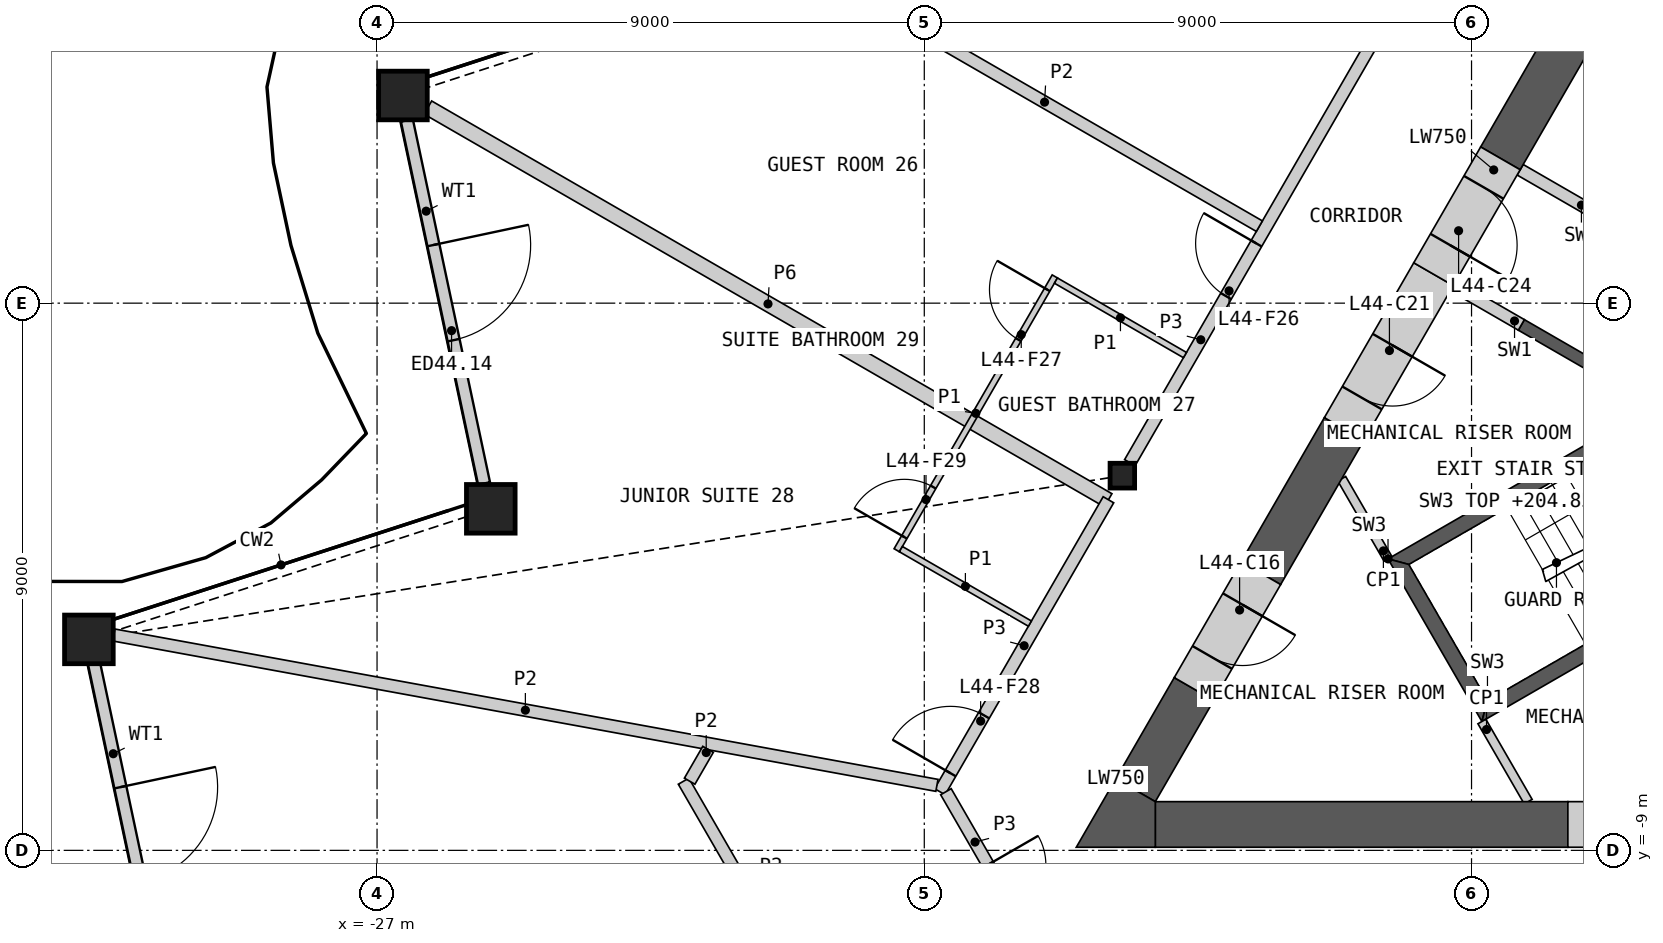
"""IFC4 building model, lengths in metres.
Left out: names, types, materials, properties, quantities, classifications, styles, units other than length and angle.
Written with IfcOpenShell. Run it as: python <this file> out.ifc"""

import sys

from ifc_helpers import new_model, si_unit, direction, frame, frame_2d, origin, origin_2d, place, context, subcontext, project, spatial, polyline, rectangle, hollow_rectangle, i_section, outline, extrude, element, fill, save


model = new_model("IFC4")
c1 = context("Model", 3, precision=1e-05, world=origin(), true_north=direction((0.0, 1.0)))
c2 = subcontext(c1, "Body", "Model", "MODEL_VIEW")
j1 = project(units=[si_unit("LENGTHUNIT", "METRE"), si_unit("PLANEANGLEUNIT", "RADIAN")], contexts=[c1])
p1 = place(None, origin())
s1 = spatial("IfcSite", under=j1, at=p1, CompositionType="ELEMENT")
p2 = place(p1, origin())
s2 = spatial("IfcBuilding", under=s1, at=p2, CompositionType="ELEMENT")
p3 = place(p2, frame((0.0, 0.0, 201.6)))
s3 = spatial("IfcBuildingStorey", under=s2, at=p3, CompositionType="ELEMENT", Elevation=201.6)
for number, where, z_axis, x_axis in (
    (1, (-26.574, 3.415, 0.0), (0.0, 0.0, 1.0), (1.0, 0.0, 0.0)),
    (2, (-25.129, -3.383, 0.0), (0.0, 0.0, 1.0), (1.0, 0.0, 0.0)),
    (3, (-31.739, -5.53, 0.0), (0.0, 0.0, 1.0), (1.0, 0.0, 0.0)),
):
    element("IfcColumn", number, at=place(p3, frame(where, z_axis=z_axis, x_axis=x_axis)), inside=s3, PredefinedType="COLUMN", context=c2, shape_type="SweptSolid", body=[
        extrude(hollow_rectangle(XDim=0.8, YDim=0.8, WallThickness=0.05, at=origin_2d()), origin(), (0.0, 0.0, 1.0), 3.6),
    ])
p4 = place(p3, frame((-14.743, -2.837, 0.0), z_axis=(0.0, 0.0, 1.0), x_axis=(1.0, 0.0, 0.0)))
e4 = element("IfcColumn", 4, at=p4, inside=s3, PredefinedType="COLUMN", context=c2, shape_type="SweptSolid", body=[
    extrude(i_section(OverallWidth=0.404, OverallDepth=0.407, WebThickness=0.027, FlangeThickness=0.044, at=origin_2d()), origin(), (0.0, 0.0, 1.0), 3.6),
])
p5 = place(p3, frame((-26.51, 3.006, 0.0), z_axis=(0.0, 0.0, 1.0), x_axis=(0.207920445063, -0.978145739921, 0.0)))
e5 = element("IfcWall", 5, at=p5, inside=s3, PredefinedType="SOLIDWALL", context=c2, shape_type="SweptSolid", body=[
    extrude(rectangle(XDim=6.106, YDim=0.2, at=frame_2d((3.053, 0.0))), origin(), (0.0, 0.0, 1.0), 2.701),
])
p6 = place(p5, frame((2.096, 0.0, 0.0)))
e6 = element("IfcOpeningElement", 6, at=p6, cuts=e5, PredefinedType="OPENING", context=c2, shape_type="SweptSolid", body=[
    extrude(rectangle(XDim=1.6, YDim=2.4, at=frame_2d((0.8, 1.2))), frame((0.0, 0.11, 0.0), z_axis=(0.0, -1.0, 0.0), x_axis=(1.0, 0.0, 0.0)), (0.0, 0.0, 1.0), 0.22),
])
p7 = place(p3, frame((-31.657, -5.91, 0.0), z_axis=(0.0, 0.0, 1.0), x_axis=(0.207917293494, -0.978146409831, 0.0)))
e7 = element("IfcWall", 7, at=p7, inside=s3, PredefinedType="SOLIDWALL", context=c2, shape_type="SweptSolid", body=[
    extrude(rectangle(XDim=6.135, YDim=0.2, at=frame_2d((3.068, 0.0))), origin(), (0.0, 0.0, 1.0), 2.701),
])
p8 = place(p7, frame((2.096, 0.0, 0.0)))
e8 = element("IfcOpeningElement", 8, at=p8, cuts=e7, PredefinedType="OPENING", context=c2, shape_type="SweptSolid", body=[
    extrude(rectangle(XDim=1.6, YDim=2.4, at=frame_2d((0.8, 1.2))), frame((0.0, 0.11, 0.0), z_axis=(0.0, -1.0, 0.0), x_axis=(1.0, 0.0, 0.0)), (0.0, 0.0, 1.0), 0.22),
])
p9 = place(p3, origin())
e9 = element("IfcWall", 9, at=p9, inside=s3, PredefinedType="SHEAR", context=c2, shape_type="SweptSolid", body=[
    extrude(outline(polyline([(-6.061, -1.697), (-8.231, -0.444), (-8.131, -0.271), (-5.96, -1.524), (-6.061, -1.697)])), origin(), (0.0, 0.0, 1.0), 3.25),
])
for number, where, z_axis, x_axis in (
    (10, (-7.081, 1.548, 0.0), (0.0, 0.0, 1.0), (-0.866, 0.5, 0.0)),
    (11, (-8.181, -0.357, 0.0), (0.0, 0.0, 1.0), (-0.866, 0.5, 0.0)),
):
    element("IfcWall", number, at=place(p3, frame(where, z_axis=z_axis, x_axis=x_axis)), inside=s3, PredefinedType="SHEAR", context=c2, shape_type="SweptSolid", body=[
        extrude(rectangle(XDim=1.293, YDim=0.2, at=frame_2d((0.646, 0.0))), origin(), (0.0, 0.0, 1.0), 3.25),
    ])
p10 = place(p3, origin())
e12 = element("IfcWall", 12, at=p10, inside=s3, PredefinedType="SHEAR", context=c2, shape_type="SweptSolid", body=[
    extrude(outline(polyline([(-5.307, -1.281), (-10.374, -4.206), (-10.032, -4.298), (-5.182, -1.498), (-5.307, -1.281)])), origin(), (0.0, 0.0, 1.0), 3.25),
])
p11 = place(p3, origin())
e13 = element("IfcWall", 13, at=p11, inside=s3, PredefinedType="SHEAR", context=c2, shape_type="SweptSolid", body=[
    extrude(outline(polyline([(-10.374, -4.206), (-8.83, -6.881), (-8.738, -6.539), (-10.032, -4.298), (-10.374, -4.206)])), origin(), (0.0, 0.0, 1.0), 3.25),
])
p12 = place(p3, origin())
e14 = element("IfcWall", 14, at=p12, inside=s3, PredefinedType="SHEAR", context=c2, shape_type="SweptSolid", body=[
    extrude(outline(polyline([(-8.738, -6.539), (-8.83, -6.881), (-3.763, -3.956), (-3.888, -3.739), (-8.738, -6.539)])), origin(), (0.0, 0.0, 1.0), 3.25),
])
for number, where, z_axis, x_axis in (
    (15, (-8.83, -6.881, 0.0), (0.0, 0.0, 1.0), (0.5, -0.866, 0.0)),
    (16, (-10.374, -4.206, 0.0), (0.0, 0.0, 1.0), (-0.5, 0.866, 0.0)),
):
    element("IfcWall", number, at=place(p3, frame(where, z_axis=z_axis, x_axis=x_axis)), inside=s3, PredefinedType="PARTITIONING", context=c2, shape_type="SweptSolid", body=[
        extrude(rectangle(XDim=1.522, YDim=0.15, at=frame_2d((0.761, 0.0))), origin(), (0.0, 0.0, 1.0), 3.25),
    ])
p13 = place(p3, frame((-14.201, -8.574, 0.0), z_axis=(0.0, 0.0, 1.0), x_axis=(1.0, 0.0, 0.0)))
e17 = element("IfcWall", 17, at=p13, inside=s3, PredefinedType="SHEAR", context=c2, shape_type="SweptSolid", body=[
    extrude(rectangle(XDim=6.785, YDim=0.75, at=frame_2d((3.393, 0.0))), origin(), (0.0, 0.0, 1.0), 3.25),
])
p14 = place(p3, frame((-7.006, 5.012, 0.0), z_axis=(0.0, 0.0, 1.0), x_axis=(-0.49996826437, -0.866043725583, 0.0)))
e18 = element("IfcWall", 18, at=p14, inside=s3, PredefinedType="SHEAR", context=c2, shape_type="SweptSolid", body=[
    extrude(rectangle(XDim=3.038, YDim=0.75, at=frame_2d((1.519, 0.0))), origin(), (0.0, 0.0, 1.0), 3.25),
])
p15 = place(p3, frame((-11.096, -2.07, 0.0), z_axis=(0.0, 0.0, 1.0), x_axis=(-0.49992834617, -0.86606676919, 0.0)))
e19 = element("IfcWall", 19, at=p15, inside=s3, PredefinedType="SHEAR", context=c2, shape_type="SweptSolid", body=[
    extrude(rectangle(XDim=2.737, YDim=0.75, at=frame_2d((1.369, 0.0))), origin(), (0.0, 0.0, 1.0), 3.25),
])
p16 = place(p3, frame((-13.564, -6.346, 0.0), z_axis=(0.0, 0.0, 1.0), x_axis=(-0.499989888488, -0.86603124159, 0.0)))
e20 = element("IfcWall", 20, at=p16, inside=s3, PredefinedType="SHEAR", context=c2, shape_type="SweptSolid", body=[
    extrude(rectangle(XDim=1.923, YDim=0.75, at=frame_2d((0.961, 0.0))), origin(), (0.0, 0.0, 1.0), 3.25),
])
p17 = place(p3, origin())
e21 = element("IfcWall", 21, at=p17, inside=s3, PredefinedType="SHEAR", context=c2, shape_type="SweptSolid", body=[
    extrude(outline(polyline([(-14.851, -7.824), (-14.201, -8.199), (-14.201, -8.949), (-15.5, -8.949), (-14.851, -7.824)])), origin(), (0.0, 0.0, 1.0), 3.25),
])
p18 = place(p3, frame((-12.464, -4.441, 0.0), z_axis=(0.0, 0.0, 1.0), x_axis=(-0.499994660107, -0.866028486751, 0.0)))
e22 = element("IfcWall", 22, at=p18, inside=s3, PredefinedType="SHEAR", context=c2, shape_type="SweptSolid", body=[
    extrude(rectangle(XDim=2.2, YDim=0.75, at=frame_2d((1.1, 0.0))), origin(), (0.0, 0.0, 1.0), 3.25),
])
p19 = place(p18, frame((0.6, 0.0, 0.0)))
e23 = element("IfcOpeningElement", 23, at=p19, cuts=e22, PredefinedType="OPENING", context=c2, shape_type="SweptSolid", body=[
    extrude(rectangle(XDim=1.0, YDim=2.1, at=frame_2d((0.5, 1.05))), frame((0.0, 0.385, 0.0), z_axis=(0.0, -1.0, 0.0), x_axis=(1.0, 0.0, 0.0)), (0.0, 0.0, 1.0), 0.77),
])
p20 = place(p3, frame((-9.625, 0.477, 0.0), z_axis=(0.0, 0.0, 1.0), x_axis=(-0.500005104963, -0.866022456413, 0.0)))
e24 = element("IfcWall", 24, at=p20, inside=s3, PredefinedType="SHEAR", context=c2, shape_type="SweptSolid", body=[
    extrude(rectangle(XDim=2.941, YDim=0.75, at=frame_2d((1.47, 0.0))), origin(), (0.0, 0.0, 1.0), 3.25),
])
p21 = place(p20, frame((1.35, 0.0, 0.0)))
e25 = element("IfcOpeningElement", 25, at=p21, cuts=e24, PredefinedType="OPENING", context=c2, shape_type="SweptSolid", body=[
    extrude(rectangle(XDim=1.0, YDim=2.1, at=frame_2d((0.5, 1.05))), frame((0.0, 0.385, 0.0), z_axis=(0.0, -1.0, 0.0), x_axis=(1.0, 0.0, 0.0)), (0.0, 0.0, 1.0), 0.77),
])
p22 = place(p3, frame((-7.416, -8.574, 0.0), z_axis=(0.0, 0.0, 1.0), x_axis=(1.0, 0.0, 0.0)))
e26 = element("IfcWall", 26, at=p22, inside=s3, PredefinedType="SHEAR", context=c2, shape_type="SweptSolid", body=[
    extrude(rectangle(XDim=2.2, YDim=0.75, at=frame_2d((1.1, 0.0))), origin(), (0.0, 0.0, 1.0), 3.25),
])
p23 = place(p22, frame((0.6, 0.0, 0.0)))
e27 = element("IfcOpeningElement", 27, at=p23, cuts=e26, PredefinedType="OPENING", context=c2, shape_type="SweptSolid", body=[
    extrude(rectangle(XDim=1.0, YDim=2.1, at=frame_2d((0.5, 1.05))), frame((0.0, 0.385, 0.0), z_axis=(0.0, -1.0, 0.0), x_axis=(1.0, 0.0, 0.0)), (0.0, 0.0, 1.0), 0.77),
])
p24 = place(p3, frame((-8.525, 2.382, 0.0), z_axis=(0.0, 0.0, 1.0), x_axis=(-0.500077893725, -0.86598042715, 0.0)))
e28 = element("IfcWall", 28, at=p24, inside=s3, PredefinedType="SHEAR", context=c2, shape_type="SweptSolid", body=[
    extrude(rectangle(XDim=2.2, YDim=0.75, at=frame_2d((1.1, 0.0))), origin(), (0.0, 0.0, 1.0), 3.25),
])
p25 = place(p24, frame((0.55, 0.0, 0.0)))
e29 = element("IfcOpeningElement", 29, at=p25, cuts=e28, PredefinedType="OPENING", context=c2, shape_type="SweptSolid", body=[
    extrude(rectangle(XDim=1.1, YDim=2.1, at=frame_2d((0.55, 1.05))), frame((0.0, 0.385, 0.0), z_axis=(0.0, -1.0, 0.0), x_axis=(1.0, 0.0, 0.0)), (0.0, 0.0, 1.0), 0.77),
])
p26 = place(p3, frame((-26.164, 3.217, 0.0), z_axis=(0.0, 0.0, 1.0), x_axis=(0.866026026416, -0.499998921569, 0.0)))
e30 = element("IfcWall", 30, at=p26, inside=s3, PredefinedType="PARTITIONING", context=c2, shape_type="SweptSolid", body=[
    extrude(rectangle(XDim=12.918, YDim=0.25, at=frame_2d((6.459, 0.0))), origin(), (0.0, 0.0, 1.0), 2.404),
])
p27 = place(p3, frame((-14.619, -2.624, 0.0), z_axis=(0.0, 0.0, 1.0), x_axis=(0.50000393355, 0.866023132736, 0.0)))
e31 = element("IfcWall", 31, at=p27, inside=s3, PredefinedType="PARTITIONING", context=c2, shape_type="SweptSolid", body=[
    extrude(rectangle(XDim=9.335, YDim=0.2, at=frame_2d((4.667, 0.0))), origin(), (0.0, 0.0, 1.0), 3.25),
])
p28 = place(p27, frame((3.163, 0.0, 0.0)))
e32 = element("IfcOpeningElement", 32, at=p28, cuts=e31, PredefinedType="OPENING", context=c2, shape_type="SweptSolid", body=[
    extrude(rectangle(XDim=1.0, YDim=2.1, at=frame_2d((0.5, 1.05))), frame((0.0, 0.11, 0.0), z_axis=(0.0, -1.0, 0.0), x_axis=(1.0, 0.0, 0.0)), (0.0, 0.0, 1.0), 0.22),
])
p29 = place(p3, frame((-17.744, -8.035, 0.0), z_axis=(0.0, 0.0, 1.0), x_axis=(0.500003221507, 0.866023543838, 0.0)))
e33 = element("IfcWall", 33, at=p29, inside=s3, PredefinedType="PARTITIONING", context=c2, shape_type="SweptSolid", body=[
    extrude(rectangle(XDim=5.545, YDim=0.2, at=frame_2d((2.772, 0.0))), origin(), (0.0, 0.0, 1.0), 3.25),
])
p30 = place(p29, frame((0.351, 0.0, 0.0)))
e34 = element("IfcOpeningElement", 34, at=p30, cuts=e33, PredefinedType="OPENING", context=c2, shape_type="SweptSolid", body=[
    extrude(rectangle(XDim=1.1, YDim=2.1, at=frame_2d((0.55, 1.05))), frame((0.0, 0.11, 0.0), z_axis=(0.0, -1.0, 0.0), x_axis=(1.0, 0.0, 0.0)), (0.0, 0.0, 1.0), 0.22),
])
p31 = place(p3, frame((-17.644, -8.035, 0.0), z_axis=(0.0, 0.0, 1.0), x_axis=(0.499961815444, -0.866047448526, 0.0)))
e35 = element("IfcWall", 35, at=p31, inside=s3, PredefinedType="PARTITIONING", context=c2, shape_type="SweptSolid", body=[
    extrude(rectangle(XDim=3.826, YDim=0.2, at=frame_2d((1.913, 0.0))), origin(), (0.0, 0.0, 1.0), 3.25),
])
p32 = place(p31, frame((1.386, 0.0, 0.0)))
e36 = element("IfcOpeningElement", 36, at=p32, cuts=e35, PredefinedType="OPENING", context=c2, shape_type="SweptSolid", body=[
    extrude(rectangle(XDim=0.95, YDim=2.1, at=frame_2d((0.475, 1.05))), frame((0.0, 0.11, 0.0), z_axis=(0.0, -1.0, 0.0), x_axis=(1.0, 0.0, 0.0)), (0.0, 0.0, 1.0), 0.22),
])
p33 = place(p3, frame((-31.329, -5.458, 0.0), z_axis=(0.0, 0.0, 1.0), x_axis=(0.983720538919, -0.179705039744, 0.0)))
e37 = element("IfcWall", 37, at=p33, inside=s3, PredefinedType="PARTITIONING", context=c2, shape_type="SweptSolid", body=[
    extrude(rectangle(XDim=13.761, YDim=0.2, at=frame_2d((6.88, 0.0))), origin(), (0.0, 0.0, 1.0), 2.404),
])
p34 = place(p3, frame((-19.555, 5.345, 0.0), z_axis=(0.0, 0.0, 1.0), x_axis=(0.866026623601, -0.49999788721, 0.0)))
e38 = element("IfcWall", 38, at=p34, inside=s3, PredefinedType="PARTITIONING", context=c2, shape_type="SweptSolid", body=[
    extrude(rectangle(XDim=8.159, YDim=0.2, at=frame_2d((4.079, 0.0))), origin(), (0.0, 0.0, 1.0), 2.404),
])
p35 = place(p3, frame((-21.958, -7.862, 0.0), z_axis=(0.0, 0.0, 1.0), x_axis=(0.499987304225, -0.866032733569, 0.0)))
e39 = element("IfcWall", 39, at=p35, inside=s3, PredefinedType="PARTITIONING", context=c2, shape_type="SweptSolid", body=[
    extrude(rectangle(XDim=4.176, YDim=0.2, at=frame_2d((2.088, 0.0))), origin(), (0.0, 0.0, 1.0), 2.404),
])
p36 = place(p3, frame((-21.859, -7.862, 0.0), z_axis=(0.0, 0.0, 1.0), x_axis=(0.50022374246, 0.865896187473, 0.0)))
e40 = element("IfcWall", 40, at=p36, inside=s3, PredefinedType="PARTITIONING", context=c2, shape_type="SweptSolid", body=[
    extrude(rectangle(XDim=0.604, YDim=0.2, at=frame_2d((0.302, 0.0))), origin(), (0.0, 0.0, 1.0), 2.404),
])
p37 = place(p3, frame((-18.453, -4.064, 0.0), z_axis=(0.0, 0.0, 1.0), x_axis=(0.499971721724, 0.866041729639, 0.0)))
e41 = element("IfcWall", 41, at=p37, inside=s3, PredefinedType="PARTITIONING", context=c2, shape_type="SweptSolid", body=[
    extrude(rectangle(XDim=5.2, YDim=0.1, at=frame_2d((2.6, 0.0))), origin(), (0.0, 0.0, 1.0), 2.404),
])
p38 = place(p37, frame((4.0, 0.0, 0.0)))
e42 = element("IfcOpeningElement", 42, at=p38, cuts=e41, PredefinedType="OPENING", context=c2, shape_type="SweptSolid", body=[
    extrude(rectangle(XDim=0.95, YDim=2.1, at=frame_2d((0.475, 1.05))), frame((0.0, 0.06, 0.0), z_axis=(0.0, -1.0, 0.0), x_axis=(1.0, 0.0, 0.0)), (0.0, 0.0, 1.0), 0.12),
])
p39 = place(p37, frame((0.25, 0.0, 0.0)))
e43 = element("IfcOpeningElement", 43, at=p39, cuts=e41, PredefinedType="OPENING", context=c2, shape_type="SweptSolid", body=[
    extrude(rectangle(XDim=0.95, YDim=2.1, at=frame_2d((0.475, 1.05))), frame((0.0, 0.06, 0.0), z_axis=(0.0, -1.0, 0.0), x_axis=(1.0, 0.0, 0.0)), (0.0, 0.0, 1.0), 0.12),
])
p40 = place(p3, frame((-15.835, 0.371, 0.0), z_axis=(0.0, 0.0, 1.0), x_axis=(0.866014668023, -0.500018594424, 0.0)))
e44 = element("IfcWall", 44, at=p40, inside=s3, PredefinedType="PARTITIONING", context=c2, shape_type="SweptSolid", body=[
    extrude(rectangle(XDim=2.45, YDim=0.1, at=frame_2d((1.225, 0.0))), origin(), (0.0, 0.0, 1.0), 2.404),
])
p41 = place(p3, frame((-18.385, -4.046, 0.0), z_axis=(0.0, 0.0, 1.0), x_axis=(0.866057815567, -0.499943856944, 0.0)))
e45 = element("IfcWall", 45, at=p41, inside=s3, PredefinedType="PARTITIONING", context=c2, shape_type="SweptSolid", body=[
    extrude(rectangle(XDim=2.45, YDim=0.1, at=frame_2d((1.225, 0.0))), origin(), (0.0, 0.0, 1.0), 2.404),
])
p42 = place(p6, origin())
e46 = element("IfcDoor", 46, at=p42, inside=s3, OperationType="DOUBLE_DOOR_SINGLE_SWING", PredefinedType="DOOR", context=c2, shape_type="SweptSolid", body=[
    extrude(rectangle(XDim=1.6, YDim=2.4, at=frame_2d((0.8, 1.2))), frame((0.0, 0.025, 0.0), z_axis=(0.0, -1.0, 0.0), x_axis=(1.0, 0.0, 0.0)), (0.0, 0.0, 1.0), 0.05),
])
fill(e6, e46)
p43 = place(p8, origin())
e47 = element("IfcDoor", 47, at=p43, inside=s3, OperationType="DOUBLE_DOOR_SINGLE_SWING", PredefinedType="DOOR", context=c2, shape_type="SweptSolid", body=[
    extrude(rectangle(XDim=1.6, YDim=2.4, at=frame_2d((0.8, 1.2))), frame((0.0, 0.025, 0.0), z_axis=(0.0, -1.0, 0.0), x_axis=(1.0, 0.0, 0.0)), (0.0, 0.0, 1.0), 0.05),
])
fill(e8, e47)
p44 = place(p19, origin())
e48 = element("IfcDoor", 48, at=p44, inside=s3, OperationType="SINGLE_SWING_LEFT", PredefinedType="DOOR", context=c2, shape_type="SweptSolid", body=[
    extrude(rectangle(XDim=1.0, YDim=2.1, at=frame_2d((0.5, 1.05))), frame((0.0, 0.13, 0.0), z_axis=(0.0, -1.0, 0.0), x_axis=(1.0, 0.0, 0.0)), (0.0, 0.0, 1.0), 0.05),
])
fill(e23, e48)
p45 = place(p21, origin())
e49 = element("IfcDoor", 49, at=p45, inside=s3, OperationType="SINGLE_SWING_LEFT", PredefinedType="DOOR", context=c2, shape_type="SweptSolid", body=[
    extrude(rectangle(XDim=1.0, YDim=2.1, at=frame_2d((0.5, 1.05))), frame((0.0, 0.13, 0.0), z_axis=(0.0, -1.0, 0.0), x_axis=(1.0, 0.0, 0.0)), (0.0, 0.0, 1.0), 0.05),
])
fill(e25, e49)
p46 = place(p25, origin())
e50 = element("IfcDoor", 50, at=p46, inside=s3, OperationType="SINGLE_SWING_RIGHT", PredefinedType="DOOR", context=c2, shape_type="SweptSolid", body=[
    extrude(rectangle(XDim=1.1, YDim=2.1, at=frame_2d((0.55, 1.05))), frame((0.0, 0.13, 0.0), z_axis=(0.0, -1.0, 0.0), x_axis=(1.0, 0.0, 0.0)), (0.0, 0.0, 1.0), 0.05),
])
fill(e29, e50)
p47 = place(p28, origin())
e51 = element("IfcDoor", 51, at=p47, inside=s3, OperationType="SINGLE_SWING_RIGHT", PredefinedType="DOOR", context=c2, shape_type="SweptSolid", body=[
    extrude(rectangle(XDim=1.0, YDim=2.1, at=frame_2d((0.5, 1.05))), frame((0.0, 0.025, 0.0), z_axis=(0.0, -1.0, 0.0), x_axis=(1.0, 0.0, 0.0)), (0.0, 0.0, 1.0), 0.05),
])
fill(e32, e51)
p48 = place(p38, origin())
e52 = element("IfcDoor", 52, at=p48, inside=s3, OperationType="SINGLE_SWING_RIGHT", PredefinedType="DOOR", context=c2, shape_type="SweptSolid", body=[
    extrude(rectangle(XDim=0.95, YDim=2.1, at=frame_2d((0.475, 1.05))), frame((0.0, 0.025, 0.0), z_axis=(0.0, -1.0, 0.0), x_axis=(1.0, 0.0, 0.0)), (0.0, 0.0, 1.0), 0.05),
])
fill(e42, e52)
p49 = place(p30, origin())
e53 = element("IfcDoor", 53, at=p49, inside=s3, OperationType="SINGLE_SWING_LEFT", PredefinedType="DOOR", context=c2, shape_type="SweptSolid", body=[
    extrude(rectangle(XDim=1.1, YDim=2.1, at=frame_2d((0.55, 1.05))), frame((0.0, 0.025, 0.0), z_axis=(0.0, -1.0, 0.0), x_axis=(1.0, 0.0, 0.0)), (0.0, 0.0, 1.0), 0.05),
])
fill(e34, e53)
p50 = place(p39, origin())
e54 = element("IfcDoor", 54, at=p50, inside=s3, OperationType="SINGLE_SWING_LEFT", PredefinedType="DOOR", context=c2, shape_type="SweptSolid", body=[
    extrude(rectangle(XDim=0.95, YDim=2.1, at=frame_2d((0.475, 1.05))), frame((0.0, 0.025, 0.0), z_axis=(0.0, -1.0, 0.0), x_axis=(1.0, 0.0, 0.0)), (0.0, 0.0, 1.0), 0.05),
])
fill(e43, e54)
save(model, sys.argv[1])
